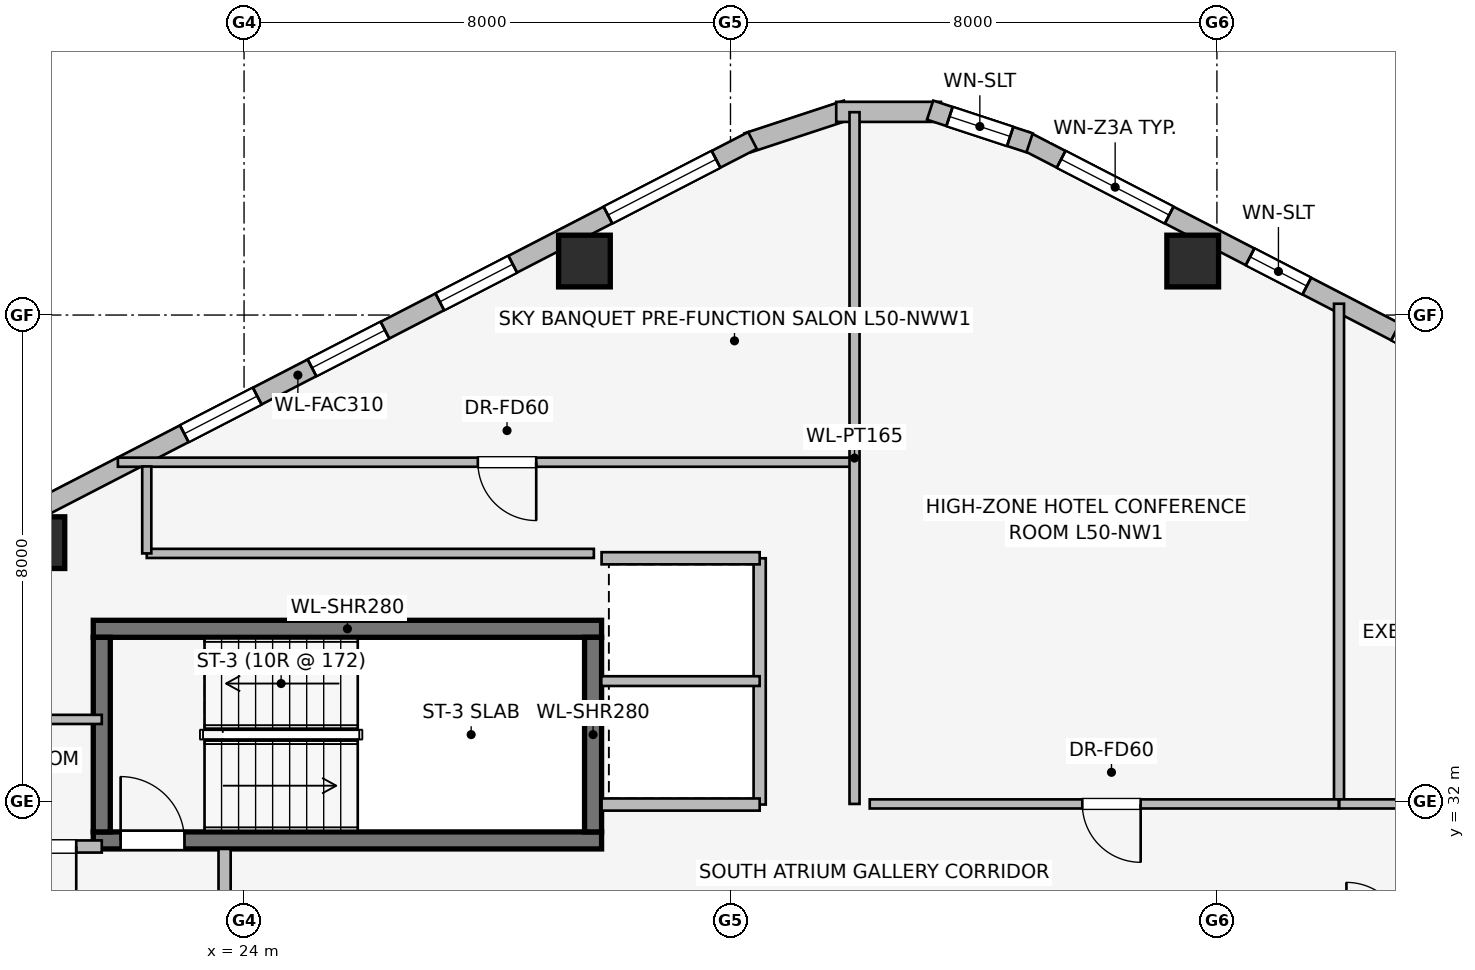
"""IFC4 building model, lengths in metres.
Left out: names, types, materials, properties, quantities, classifications, styles, units other than length and angle.
Written with IfcOpenShell. Run it as: python <this file> out.ifc"""

import sys

from ifc_helpers import new_model, si_unit, direction, frame, frame_2d, origin, origin_2d, place, context, subcontext, project, spatial, rectangle, extrude, element, fill, save


model = new_model("IFC4")
c1 = context("Model", 3, precision=1e-05, world=origin(), true_north=direction((0.0, 1.0)))
c2 = subcontext(c1, "Body", "Model", "MODEL_VIEW")
j1 = project(units=[si_unit("LENGTHUNIT", "METRE"), si_unit("PLANEANGLEUNIT", "RADIAN")], contexts=[c1])
p1 = place(None, origin())
s1 = spatial("IfcSite", under=j1, at=p1, CompositionType="ELEMENT")
p2 = place(p1, origin())
s2 = spatial("IfcBuilding", under=s1, at=p2, CompositionType="ELEMENT")
p3 = place(p2, frame((0.0, 0.0, 184.35)))
s3 = spatial("IfcBuildingStorey", under=s2, at=p3, CompositionType="ELEMENT", Elevation=184.35)
p4 = place(p3, frame((21.52, 31.36, 0.0), z_axis=(0.0, 0.0, 1.0), x_axis=(1.0, 0.0, 0.0)))
e1 = element("IfcWall", 1, at=p4, inside=s3, PredefinedType="SHEAR", context=c2, shape_type="SweptSolid", body=[
    extrude(rectangle(XDim=8.36, YDim=0.28, at=frame_2d((4.18, 0.0))), origin(), (0.0, 0.0, 1.0), 3.45),
])
p5 = place(p4, frame((0.45, 0.0, 0.0)))
e2 = element("IfcOpeningElement", 2, at=p5, cuts=e1, PredefinedType="OPENING", context=c2, shape_type="SweptSolid", body=[
    extrude(rectangle(XDim=1.05, YDim=2.0, at=frame_2d((0.525, 1.0))), frame((0.0, 0.15, 0.0), z_axis=(0.0, -1.0, 0.0), x_axis=(1.0, 0.0, 0.0)), (0.0, 0.0, 1.0), 0.3),
])
p6 = place(p3, frame((29.88, 34.84, 0.0), z_axis=(0.0, 0.0, 1.0), x_axis=(-1.0, 0.0, 0.0)))
e3 = element("IfcWall", 3, at=p6, inside=s3, PredefinedType="SHEAR", context=c2, shape_type="SweptSolid", body=[
    extrude(rectangle(XDim=8.36, YDim=0.28, at=frame_2d((4.18, 0.0))), origin(), (0.0, 0.0, 1.0), 3.45),
])
for number, where, z_axis, x_axis in (
    (4, (21.66, 34.7, 0.0), (0.0, 0.0, 1.0), (0.0, -1.0, 0.0)),
    (5, (29.74, 31.5, 0.0), (0.0, 0.0, 1.0), (0.0, 1.0, 0.0)),
):
    element("IfcWall", number, at=place(p3, frame(where, z_axis=z_axis, x_axis=x_axis)), inside=s3, PredefinedType="SHEAR", context=c2, shape_type="SweptSolid", body=[
        extrude(rectangle(XDim=3.2, YDim=0.28, at=frame_2d((1.6, 0.0))), origin(), (0.0, 0.0, 1.0), 3.45),
    ])
for number, where, z_axis, x_axis in (
    (6, (39.602, 40.888, 0.0), (0.0, 0.0, 1.0), (1.0, 0.0, 0.0)),
    (7, (29.598, 40.888, 0.0), (0.0, 0.0, 1.0), (1.0, 0.0, 0.0)),
    (8, (20.626, 36.257, 0.0), (0.0, 0.0, 1.0), (1.0, 0.0, 0.0)),
):
    element("IfcColumn", number, at=place(p3, frame(where, z_axis=z_axis, x_axis=x_axis)), inside=s3, PredefinedType="COLUMN", context=c2, shape_type="SweptSolid", body=[
        extrude(rectangle(XDim=0.85, YDim=0.85, at=origin_2d()), origin(), (0.0, 0.0, 1.0), 3.45),
    ])
p7 = place(p3, frame((36.838, 42.871, 0.0), z_axis=(0.0, 0.0, 1.0), x_axis=(0.888626188278, -0.458632202867, 0.0)))
e9 = element("IfcWall", 9, at=p7, inside=s3, PredefinedType="STANDARD", context=c2, shape_type="SweptSolid", body=[
    extrude(rectangle(XDim=16.828, YDim=0.31, at=frame_2d((8.414, 0.0))), origin(), (0.0, 0.0, 1.0), 3.19),
])
p8 = place(p7, frame((0.675, 0.0, 0.75)))
e10 = element("IfcOpeningElement", 10, at=p8, cuts=e9, PredefinedType="OPENING", context=c2, shape_type="SweptSolid", body=[
    extrude(rectangle(XDim=2.0, YDim=1.5, at=frame_2d((1.0, 0.75))), frame((0.0, 0.165, 0.0), z_axis=(0.0, -1.0, 0.0), x_axis=(1.0, 0.0, 0.0)), (0.0, 0.0, 1.0), 0.33),
])
p9 = place(p7, frame((4.172, 0.0, 0.75)))
e11 = element("IfcOpeningElement", 11, at=p9, cuts=e9, PredefinedType="OPENING", context=c2, shape_type="SweptSolid", body=[
    extrude(rectangle(XDim=1.05, YDim=1.4, at=frame_2d((0.525, 0.7))), frame((0.0, 0.165, 0.0), z_axis=(0.0, -1.0, 0.0), x_axis=(1.0, 0.0, 0.0)), (0.0, 0.0, 1.0), 0.33),
])
p10 = place(p7, frame((6.865, 0.0, 0.75)))
e12 = element("IfcOpeningElement", 12, at=p10, cuts=e9, PredefinedType="OPENING", context=c2, shape_type="SweptSolid", body=[
    extrude(rectangle(XDim=2.0, YDim=1.5, at=frame_2d((1.0, 0.75))), frame((0.0, 0.165, 0.0), z_axis=(0.0, -1.0, 0.0), x_axis=(1.0, 0.0, 0.0)), (0.0, 0.0, 1.0), 0.33),
])
p11 = place(p7, frame((10.22, 0.0, 0.75)))
e13 = element("IfcOpeningElement", 13, at=p11, cuts=e9, PredefinedType="OPENING", context=c2, shape_type="SweptSolid", body=[
    extrude(rectangle(XDim=2.0, YDim=1.5, at=frame_2d((1.0, 0.75))), frame((0.0, 0.165, 0.0), z_axis=(0.0, -1.0, 0.0), x_axis=(1.0, 0.0, 0.0)), (0.0, 0.0, 1.0), 0.33),
])
p12 = place(p7, frame((14.478, 0.0, 0.75)))
e14 = element("IfcOpeningElement", 14, at=p12, cuts=e9, PredefinedType="OPENING", context=c2, shape_type="SweptSolid", body=[
    extrude(rectangle(XDim=1.35, YDim=1.45, at=frame_2d((0.675, 0.725))), frame((0.0, 0.165, 0.0), z_axis=(0.0, -1.0, 0.0), x_axis=(1.0, 0.0, 0.0)), (0.0, 0.0, 1.0), 0.33),
])
p13 = place(p3, frame((32.281, 42.832, 0.0), z_axis=(0.0, 0.0, 1.0), x_axis=(0.949937416267, 0.312440242569, 0.0)))
e15 = element("IfcWall", 15, at=p13, inside=s3, PredefinedType="STANDARD", context=c2, shape_type="SweptSolid", body=[
    extrude(rectangle(XDim=1.722, YDim=0.33, at=frame_2d((0.861, 0.0))), origin(), (0.0, 0.0, 1.0), 3.19),
])
p14 = place(p3, frame((33.739, 43.341, 0.0), z_axis=(0.0, 0.0, 1.0), x_axis=(1.0, 0.0, 0.0)))
e16 = element("IfcWall", 16, at=p14, inside=s3, PredefinedType="STANDARD", context=c2, shape_type="SweptSolid", body=[
    extrude(rectangle(XDim=1.722, YDim=0.33, at=frame_2d((0.861, 0.0))), origin(), (0.0, 0.0, 1.0), 3.19),
])
p15 = place(p3, frame((35.283, 43.37, 0.0), z_axis=(0.0, 0.0, 1.0), x_axis=(0.949937416267, -0.312440242569, 0.0)))
e17 = element("IfcWall", 17, at=p15, inside=s3, PredefinedType="STANDARD", context=c2, shape_type="SweptSolid", body=[
    extrude(rectangle(XDim=1.722, YDim=0.33, at=frame_2d((0.861, 0.0))), origin(), (0.0, 0.0, 1.0), 3.19),
])
p16 = place(p15, frame((0.336, 0.0, 0.75)))
e18 = element("IfcOpeningElement", 18, at=p16, cuts=e17, PredefinedType="OPENING", context=c2, shape_type="SweptSolid", body=[
    extrude(rectangle(XDim=1.05, YDim=1.4, at=frame_2d((0.525, 0.7))), frame((0.0, 0.175, 0.0), z_axis=(0.0, -1.0, 0.0), x_axis=(1.0, 0.0, 0.0)), (0.0, 0.0, 1.0), 0.35),
])
p17 = place(p3, frame((17.408, 35.153, 0.0), z_axis=(0.0, 0.0, 1.0), x_axis=(0.888626188278, 0.458632202867, 0.0)))
e19 = element("IfcWall", 19, at=p17, inside=s3, PredefinedType="STANDARD", context=c2, shape_type="SweptSolid", body=[
    extrude(rectangle(XDim=16.828, YDim=0.31, at=frame_2d((8.414, 0.0))), origin(), (0.0, 0.0, 1.0), 3.19),
])
p18 = place(p17, frame((0.675, 0.0, 0.75)))
e20 = element("IfcOpeningElement", 20, at=p18, cuts=e19, PredefinedType="OPENING", context=c2, shape_type="SweptSolid", body=[
    extrude(rectangle(XDim=2.0, YDim=1.5, at=frame_2d((1.0, 0.75))), frame((0.0, 0.165, 0.0), z_axis=(0.0, -1.0, 0.0), x_axis=(1.0, 0.0, 0.0)), (0.0, 0.0, 1.0), 0.33),
])
p19 = place(p17, frame((6.312, 0.0, 0.75)))
e21 = element("IfcOpeningElement", 21, at=p19, cuts=e19, PredefinedType="OPENING", context=c2, shape_type="SweptSolid", body=[
    extrude(rectangle(XDim=1.35, YDim=1.45, at=frame_2d((0.675, 0.725))), frame((0.0, 0.165, 0.0), z_axis=(0.0, -1.0, 0.0), x_axis=(1.0, 0.0, 0.0)), (0.0, 0.0, 1.0), 0.33),
])
p20 = place(p17, frame((8.676, 0.0, 0.75)))
e22 = element("IfcOpeningElement", 22, at=p20, cuts=e19, PredefinedType="OPENING", context=c2, shape_type="SweptSolid", body=[
    extrude(rectangle(XDim=1.35, YDim=1.45, at=frame_2d((0.675, 0.725))), frame((0.0, 0.165, 0.0), z_axis=(0.0, -1.0, 0.0), x_axis=(1.0, 0.0, 0.0)), (0.0, 0.0, 1.0), 0.33),
])
p21 = place(p17, frame((11.041, 0.0, 0.75)))
e23 = element("IfcOpeningElement", 23, at=p21, cuts=e19, PredefinedType="OPENING", context=c2, shape_type="SweptSolid", body=[
    extrude(rectangle(XDim=1.35, YDim=1.45, at=frame_2d((0.675, 0.725))), frame((0.0, 0.165, 0.0), z_axis=(0.0, -1.0, 0.0), x_axis=(1.0, 0.0, 0.0)), (0.0, 0.0, 1.0), 0.33),
])
p22 = place(p17, frame((14.153, 0.0, 0.75)))
e24 = element("IfcOpeningElement", 24, at=p22, cuts=e19, PredefinedType="OPENING", context=c2, shape_type="SweptSolid", body=[
    extrude(rectangle(XDim=2.0, YDim=1.5, at=frame_2d((1.0, 0.75))), frame((0.0, 0.165, 0.0), z_axis=(0.0, -1.0, 0.0), x_axis=(1.0, 0.0, 0.0)), (0.0, 0.0, 1.0), 0.33),
])
p23 = place(p3, frame((23.68, 25.68, 0.0), z_axis=(0.0, 0.0, 1.0), x_axis=(0.0, 1.0, 0.0)))
e25 = element("IfcWall", 25, at=p23, inside=s3, PredefinedType="PARTITIONING", context=c2, shape_type="SweptSolid", body=[
    extrude(rectangle(XDim=5.54, YDim=0.2, at=frame_2d((2.77, 0.0))), origin(), (0.0, 0.0, 1.0), 3.19),
])
p24 = place(p23, frame((1.8, 0.0, 0.0)))
e26 = element("IfcOpeningElement", 26, at=p24, cuts=e25, PredefinedType="OPENING", context=c2, shape_type="SweptSolid", body=[
    extrude(rectangle(XDim=1.05, YDim=2.0, at=frame_2d((0.525, 1.0))), frame((0.0, 0.11, 0.0), z_axis=(0.0, -1.0, 0.0), x_axis=(1.0, 0.0, 0.0)), (0.0, 0.0, 1.0), 0.22),
])
p25 = place(p3, frame((21.66, 31.26, 0.0), z_axis=(0.0, 0.0, 1.0), x_axis=(-1.0, 0.0, 0.0)))
e27 = element("IfcWall", 27, at=p25, inside=s3, PredefinedType="PARTITIONING", context=c2, shape_type="SweptSolid", body=[
    extrude(rectangle(XDim=2.01, YDim=0.2, at=frame_2d((1.005, 0.0))), origin(), (0.0, 0.0, 1.0), 3.19),
])
p26 = place(p25, frame((0.42, 0.0, 0.0)))
e28 = element("IfcOpeningElement", 28, at=p26, cuts=e27, PredefinedType="OPENING", context=c2, shape_type="SweptSolid", body=[
    extrude(rectangle(XDim=0.86, YDim=2.0, at=frame_2d((0.43, 1.0))), frame((0.0, 0.11, 0.0), z_axis=(0.0, -1.0, 0.0), x_axis=(1.0, 0.0, 0.0)), (0.0, 0.0, 1.0), 0.22),
])
p27 = place(p3, frame((32.48, 31.95, 0.0), z_axis=(0.0, 0.0, 1.0), x_axis=(0.0, 1.0, 0.0)))
e29 = element("IfcWall", 29, at=p27, inside=s3, PredefinedType="PARTITIONING", context=c2, shape_type="SweptSolid", body=[
    extrude(rectangle(XDim=4.05, YDim=0.2, at=frame_2d((2.025, 0.0))), origin(), (0.0, 0.0, 1.0), 3.19),
])
for number, where, z_axis, x_axis in (
    (30, (29.88, 36.0, 0.0), (0.0, 0.0, 1.0), (1.0, 0.0, 0.0)),
    (31, (32.48, 31.95, 0.0), (0.0, 0.0, 1.0), (-1.0, 0.0, 0.0)),
):
    element("IfcWall", number, at=place(p3, frame(where, z_axis=z_axis, x_axis=x_axis)), inside=s3, PredefinedType="PARTITIONING", context=c2, shape_type="SweptSolid", body=[
        extrude(rectangle(XDim=2.6, YDim=0.2, at=frame_2d((1.3, 0.0))), origin(), (0.0, 0.0, 1.0), 3.19),
    ])
p28 = place(p3, frame((29.875, 33.98, 0.0), z_axis=(0.0, 0.0, 1.0), x_axis=(1.0, 0.0, 0.0)))
e32 = element("IfcWall", 32, at=p28, inside=s3, PredefinedType="PARTITIONING", context=c2, shape_type="SweptSolid", body=[
    extrude(rectangle(XDim=2.605, YDim=0.16, at=frame_2d((1.302, 0.0))), origin(), (0.0, 0.0, 1.0), 2.582),
])
p29 = place(p3, frame((21.66, 33.35, 0.0), z_axis=(0.0, 0.0, 1.0), x_axis=(-1.0, 0.0, 0.0)))
e33 = element("IfcWall", 33, at=p29, inside=s3, PredefinedType="PARTITIONING", context=c2, shape_type="SweptSolid", body=[
    extrude(rectangle(XDim=2.56, YDim=0.15, at=frame_2d((1.28, 0.0))), origin(), (0.0, 0.0, 1.0), 3.19),
])
p30 = place(p3, frame((34.0, 37.58, 0.0), z_axis=(0.0, 0.0, 1.0), x_axis=(-1.0, 0.0, 0.0)))
e34 = element("IfcWall", 34, at=p30, inside=s3, PredefinedType="PARTITIONING", context=c2, shape_type="SweptSolid", body=[
    extrude(rectangle(XDim=12.075, YDim=0.15, at=frame_2d((6.038, 0.0))), origin(), (0.0, 0.0, 1.0), 2.582),
])
p31 = place(p30, frame((5.195, 0.0, 0.0)))
e35 = element("IfcOpeningElement", 35, at=p31, cuts=e34, PredefinedType="OPENING", context=c2, shape_type="SweptSolid", body=[
    extrude(rectangle(XDim=0.96, YDim=2.0, at=frame_2d((0.48, 1.0))), frame((0.0, 0.085, 0.0), z_axis=(0.0, -1.0, 0.0), x_axis=(1.0, 0.0, 0.0)), (0.0, 0.0, 1.0), 0.17),
])
p32 = place(p3, frame((34.04, 31.96, 0.0), z_axis=(0.0, 0.0, 1.0), x_axis=(0.0, 1.0, 0.0)))
e36 = element("IfcWall", 36, at=p32, inside=s3, PredefinedType="PARTITIONING", context=c2, shape_type="SweptSolid", body=[
    extrude(rectangle(XDim=11.376, YDim=0.165, at=frame_2d((5.688, 0.0))), origin(), (0.0, 0.0, 1.0), 3.19),
])
p33 = place(p3, frame((42.008, 31.97, 0.0), z_axis=(0.0, 0.0, 1.0), x_axis=(0.0, 1.0, 0.0)))
e37 = element("IfcWall", 37, at=p33, inside=s3, PredefinedType="PARTITIONING", context=c2, shape_type="SweptSolid", body=[
    extrude(rectangle(XDim=8.216, YDim=0.165, at=frame_2d((4.108, 0.0))), origin(), (0.0, 0.0, 1.0), 3.19),
])
p34 = place(p3, frame((42.003, 31.96, 0.0), z_axis=(0.0, 0.0, 1.0), x_axis=(-1.0, 0.0, 0.0)))
e38 = element("IfcWall", 38, at=p34, inside=s3, PredefinedType="PARTITIONING", context=c2, shape_type="SweptSolid", body=[
    extrude(rectangle(XDim=7.713, YDim=0.15, at=frame_2d((3.856, 0.0))), origin(), (0.0, 0.0, 1.0), 3.19),
])
p35 = place(p34, frame((3.257, 0.0, 0.0)))
e39 = element("IfcOpeningElement", 39, at=p35, cuts=e38, PredefinedType="OPENING", context=c2, shape_type="SweptSolid", body=[
    extrude(rectangle(XDim=0.96, YDim=2.0, at=frame_2d((0.48, 1.0))), frame((0.0, 0.085, 0.0), z_axis=(0.0, -1.0, 0.0), x_axis=(1.0, 0.0, 0.0)), (0.0, 0.0, 1.0), 0.17),
])
p36 = place(p3, frame((53.97, 31.96, 0.0), z_axis=(0.0, 0.0, 1.0), x_axis=(-1.0, 0.0, 0.0)))
e40 = element("IfcWall", 40, at=p36, inside=s3, PredefinedType="PARTITIONING", context=c2, shape_type="SweptSolid", body=[
    extrude(rectangle(XDim=11.957, YDim=0.15, at=frame_2d((5.979, 0.0))), origin(), (0.0, 0.0, 1.0), 3.19),
])
p37 = place(p36, frame((5.618, 0.0, 0.0)))
e41 = element("IfcOpeningElement", 41, at=p37, cuts=e40, PredefinedType="OPENING", context=c2, shape_type="SweptSolid", body=[
    extrude(rectangle(XDim=0.96, YDim=2.0, at=frame_2d((0.48, 1.0))), frame((0.0, 0.085, 0.0), z_axis=(0.0, -1.0, 0.0), x_axis=(1.0, 0.0, 0.0)), (0.0, 0.0, 1.0), 0.17),
])
p38 = place(p3, frame((29.753, 36.08, 0.0), z_axis=(0.0, 0.0, 1.0), x_axis=(-1.0, 0.0, 0.0)))
e42 = element("IfcWall", 42, at=p38, inside=s3, PredefinedType="PARTITIONING", context=c2, shape_type="SweptSolid", body=[
    extrude(rectangle(XDim=7.353, YDim=0.15, at=frame_2d((3.677, 0.0))), origin(), (0.0, 0.0, 1.0), 3.19),
])
p39 = place(p3, frame((22.4, 36.08, 0.0), z_axis=(0.0, 0.0, 1.0), x_axis=(0.0, 1.0, 0.0)))
e43 = element("IfcWall", 43, at=p39, inside=s3, PredefinedType="PARTITIONING", context=c2, shape_type="SweptSolid", body=[
    extrude(rectangle(XDim=1.43, YDim=0.15, at=frame_2d((0.715, 0.0))), origin(), (0.0, 0.0, 1.0), 3.19),
])
p40 = place(p8, origin())
e44 = element("IfcWindow", 44, at=p40, inside=s3, PartitioningType="SINGLE_PANEL", PredefinedType="WINDOW", context=c2, shape_type="SweptSolid", body=[
    extrude(rectangle(XDim=2.0, YDim=1.5, at=frame_2d((1.0, 0.75))), frame((0.0, 0.03, 0.0), z_axis=(0.0, -1.0, 0.0), x_axis=(1.0, 0.0, 0.0)), (0.0, 0.0, 1.0), 0.06),
])
fill(e10, e44)
p41 = place(p9, origin())
e45 = element("IfcWindow", 45, at=p41, inside=s3, PartitioningType="SINGLE_PANEL", PredefinedType="WINDOW", context=c2, shape_type="SweptSolid", body=[
    extrude(rectangle(XDim=1.05, YDim=1.4, at=frame_2d((0.525, 0.7))), frame((0.0, 0.03, 0.0), z_axis=(0.0, -1.0, 0.0), x_axis=(1.0, 0.0, 0.0)), (0.0, 0.0, 1.0), 0.06),
])
fill(e11, e45)
p42 = place(p16, origin())
e46 = element("IfcWindow", 46, at=p42, inside=s3, PartitioningType="SINGLE_PANEL", PredefinedType="WINDOW", context=c2, shape_type="SweptSolid", body=[
    extrude(rectangle(XDim=1.05, YDim=1.4, at=frame_2d((0.525, 0.7))), frame((0.0, 0.03, 0.0), z_axis=(0.0, -1.0, 0.0), x_axis=(1.0, 0.0, 0.0)), (0.0, 0.0, 1.0), 0.06),
])
fill(e18, e46)
p43 = place(p19, origin())
e47 = element("IfcWindow", 47, at=p43, inside=s3, PartitioningType="SINGLE_PANEL", PredefinedType="WINDOW", context=c2, shape_type="SweptSolid", body=[
    extrude(rectangle(XDim=1.35, YDim=1.45, at=frame_2d((0.675, 0.725))), frame((0.0, 0.03, 0.0), z_axis=(0.0, -1.0, 0.0), x_axis=(1.0, 0.0, 0.0)), (0.0, 0.0, 1.0), 0.06),
])
fill(e21, e47)
p44 = place(p20, origin())
e48 = element("IfcWindow", 48, at=p44, inside=s3, PartitioningType="SINGLE_PANEL", PredefinedType="WINDOW", context=c2, shape_type="SweptSolid", body=[
    extrude(rectangle(XDim=1.35, YDim=1.45, at=frame_2d((0.675, 0.725))), frame((0.0, 0.03, 0.0), z_axis=(0.0, -1.0, 0.0), x_axis=(1.0, 0.0, 0.0)), (0.0, 0.0, 1.0), 0.06),
])
fill(e22, e48)
p45 = place(p21, origin())
e49 = element("IfcWindow", 49, at=p45, inside=s3, PartitioningType="SINGLE_PANEL", PredefinedType="WINDOW", context=c2, shape_type="SweptSolid", body=[
    extrude(rectangle(XDim=1.35, YDim=1.45, at=frame_2d((0.675, 0.725))), frame((0.0, 0.03, 0.0), z_axis=(0.0, -1.0, 0.0), x_axis=(1.0, 0.0, 0.0)), (0.0, 0.0, 1.0), 0.06),
])
fill(e23, e49)
p46 = place(p22, origin())
e50 = element("IfcWindow", 50, at=p46, inside=s3, PartitioningType="SINGLE_PANEL", PredefinedType="WINDOW", context=c2, shape_type="SweptSolid", body=[
    extrude(rectangle(XDim=2.0, YDim=1.5, at=frame_2d((1.0, 0.75))), frame((0.0, 0.03, 0.0), z_axis=(0.0, -1.0, 0.0), x_axis=(1.0, 0.0, 0.0)), (0.0, 0.0, 1.0), 0.06),
])
fill(e24, e50)
p47 = place(p5, origin())
e51 = element("IfcDoor", 51, at=p47, inside=s3, OperationType="SINGLE_SWING_LEFT", PredefinedType="DOOR", context=c2, shape_type="SweptSolid", body=[
    extrude(rectangle(XDim=1.05, YDim=2.0, at=frame_2d((0.525, 1.0))), frame((0.0, 0.025, 0.0), z_axis=(0.0, -1.0, 0.0), x_axis=(1.0, 0.0, 0.0)), (0.0, 0.0, 1.0), 0.05),
])
fill(e2, e51)
p48 = place(p26, origin())
e52 = element("IfcDoor", 52, at=p48, inside=s3, OperationType="SINGLE_SWING_LEFT", PredefinedType="DOOR", context=c2, shape_type="SweptSolid", body=[
    extrude(rectangle(XDim=0.86, YDim=2.0, at=frame_2d((0.43, 1.0))), frame((0.0, 0.025, 0.0), z_axis=(0.0, -1.0, 0.0), x_axis=(1.0, 0.0, 0.0)), (0.0, 0.0, 1.0), 0.05),
])
fill(e28, e52)
p49 = place(p31, origin())
e53 = element("IfcDoor", 53, at=p49, inside=s3, OperationType="SINGLE_SWING_LEFT", PredefinedType="DOOR", context=c2, shape_type="SweptSolid", body=[
    extrude(rectangle(XDim=0.96, YDim=2.0, at=frame_2d((0.48, 1.0))), frame((0.0, 0.025, 0.0), z_axis=(0.0, -1.0, 0.0), x_axis=(1.0, 0.0, 0.0)), (0.0, 0.0, 1.0), 0.05),
])
fill(e35, e53)
p50 = place(p35, origin())
e54 = element("IfcDoor", 54, at=p50, inside=s3, OperationType="SINGLE_SWING_LEFT", PredefinedType="DOOR", context=c2, shape_type="SweptSolid", body=[
    extrude(rectangle(XDim=0.96, YDim=2.0, at=frame_2d((0.48, 1.0))), frame((0.0, 0.025, 0.0), z_axis=(0.0, -1.0, 0.0), x_axis=(1.0, 0.0, 0.0)), (0.0, 0.0, 1.0), 0.05),
])
fill(e39, e54)
save(model, sys.argv[1])
